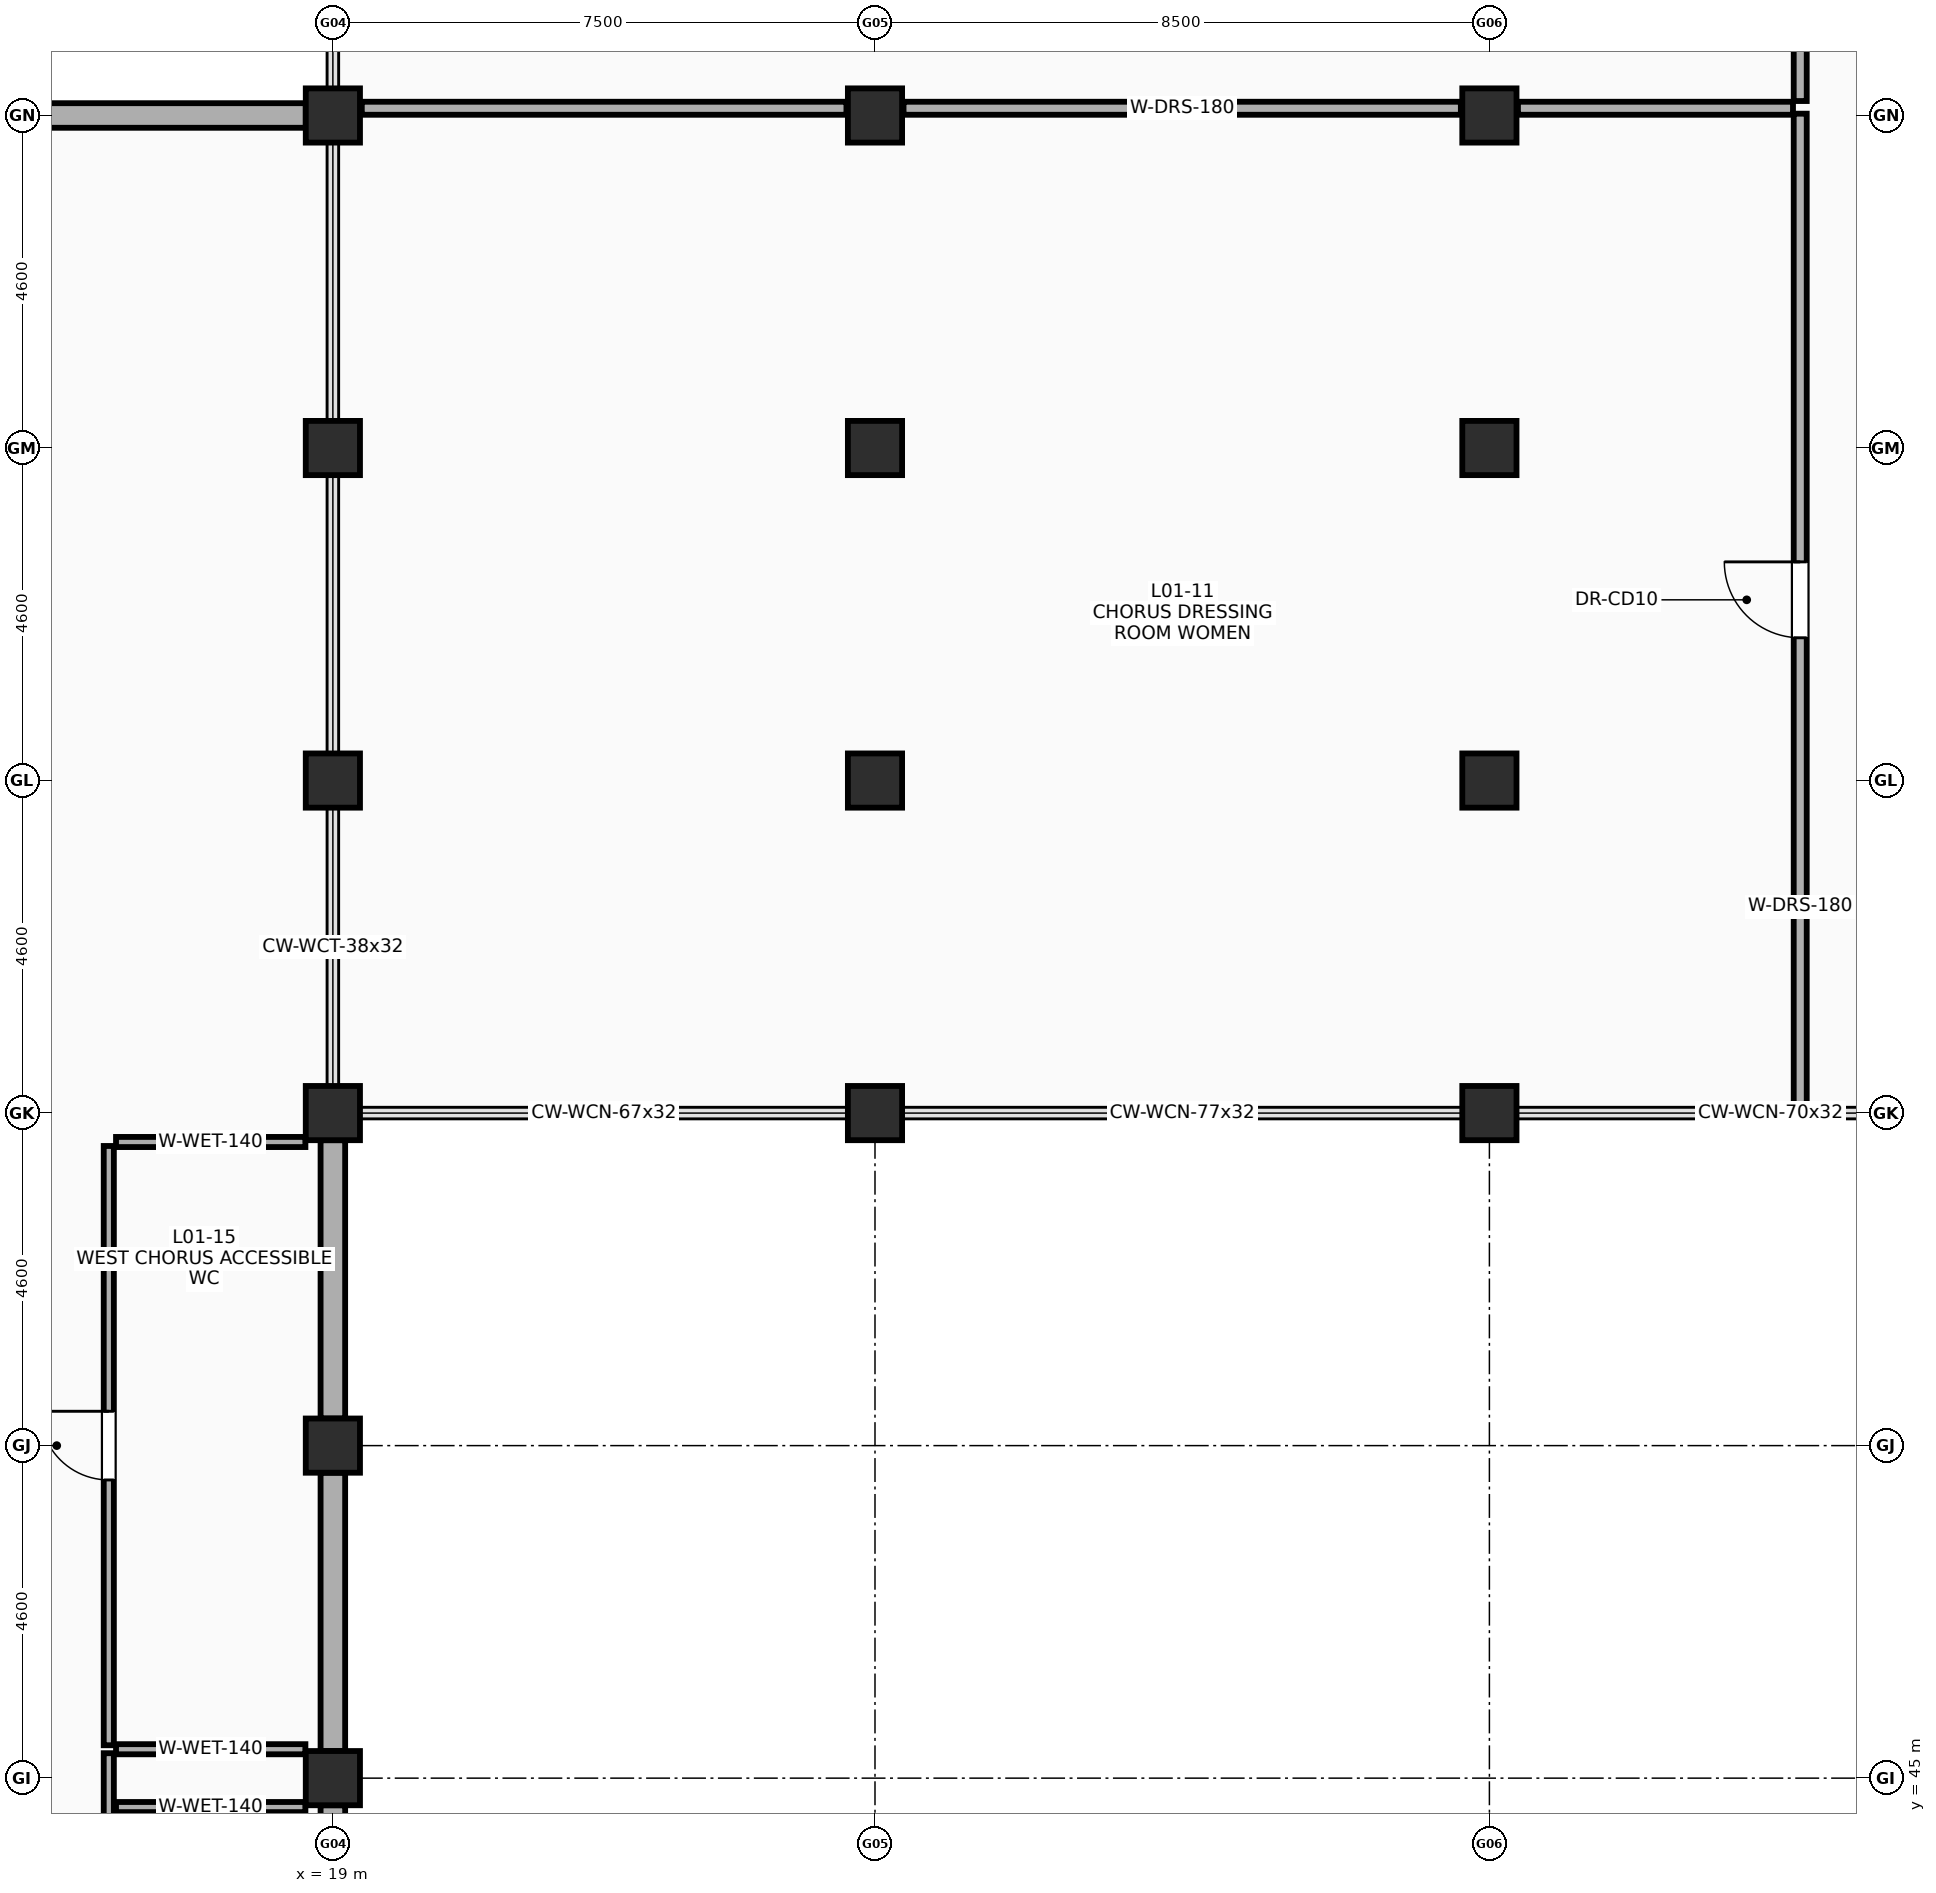
"""IFC4 building model, lengths in metres.
Left out: names, types, materials, properties, quantities, classifications, styles, units other than length and angle.
Written with IfcOpenShell. Run it as: python <this file> out.ifc"""

import sys

from ifc_helpers import new_model, si_unit, direction, frame, frame_2d, origin, origin_2d, place, context, subcontext, project, spatial, rectangle, extrude, element, fill, save


model = new_model("IFC4")
c1 = context("Model", 3, precision=1e-05, world=origin(), true_north=direction((0.0, 1.0)))
c2 = subcontext(c1, "Body", "Model", "MODEL_VIEW")
j1 = project(units=[si_unit("LENGTHUNIT", "METRE"), si_unit("PLANEANGLEUNIT", "RADIAN")], contexts=[c1])
p1 = place(None, origin())
s1 = spatial("IfcSite", under=j1, at=p1, CompositionType="ELEMENT")
p2 = place(p1, origin())
s2 = spatial("IfcBuilding", under=s1, at=p2, CompositionType="ELEMENT")
p3 = place(p2, frame((0.0, 0.0, 5.4)))
s3 = spatial("IfcBuildingStorey", under=s2, at=p3, CompositionType="ELEMENT", Elevation=5.4)
for number, where, z_axis, x_axis in (
    (1, (19.0, 45.0, 0.0), (0.0, 0.0, 1.0), (1.0, 0.0, 0.0)),
    (2, (19.0, 49.6, 0.0), (0.0, 0.0, 1.0), (1.0, 0.0, 0.0)),
    (3, (19.0, 54.2, 0.0), (0.0, 0.0, 1.0), (1.0, 0.0, 0.0)),
    (4, (19.0, 58.8, 0.0), (0.0, 0.0, 1.0), (1.0, 0.0, 0.0)),
    (5, (19.0, 63.4, 0.0), (0.0, 0.0, 1.0), (1.0, 0.0, 0.0)),
    (6, (19.0, 68.0, 0.0), (0.0, 0.0, 1.0), (1.0, 0.0, 0.0)),
    (7, (26.5, 54.2, 0.0), (0.0, 0.0, 1.0), (1.0, 0.0, 0.0)),
    (8, (26.5, 58.8, 0.0), (0.0, 0.0, 1.0), (1.0, 0.0, 0.0)),
    (9, (26.5, 63.4, 0.0), (0.0, 0.0, 1.0), (1.0, 0.0, 0.0)),
    (10, (26.5, 68.0, 0.0), (0.0, 0.0, 1.0), (1.0, 0.0, 0.0)),
    (11, (35.0, 54.2, 0.0), (0.0, 0.0, 1.0), (1.0, 0.0, 0.0)),
    (12, (35.0, 58.8, 0.0), (0.0, 0.0, 1.0), (1.0, 0.0, 0.0)),
    (13, (35.0, 63.4, 0.0), (0.0, 0.0, 1.0), (1.0, 0.0, 0.0)),
    (14, (35.0, 68.0, 0.0), (0.0, 0.0, 1.0), (1.0, 0.0, 0.0)),
):
    element("IfcColumn", number, at=place(p3, frame(where, z_axis=z_axis, x_axis=x_axis)), inside=s3, PredefinedType="COLUMN", context=c2, shape_type="SweptSolid", body=[
        extrude(rectangle(XDim=0.75, YDim=0.75, at=origin_2d()), origin(), (0.0, 0.0, 1.0), 4.4),
    ])
p4 = place(p3, frame((13.875, 68.0, 0.0), z_axis=(0.0, 0.0, 1.0), x_axis=(1.0, 0.0, 0.0)))
e15 = element("IfcWall", 15, at=p4, inside=s3, PredefinedType="SOLIDWALL", context=c2, shape_type="SweptSolid", body=[
    extrude(rectangle(XDim=4.75, YDim=0.34, at=frame_2d((2.375, 0.0))), origin(), (0.0, 0.0, 1.0), 3.2),
])
for number, where, z_axis, x_axis in (
    (16, (19.0, 40.775, 0.0), (0.0, 0.0, 1.0), (0.0, 1.0, 0.0)),
    (17, (19.0, 45.375, 0.0), (0.0, 0.0, 1.0), (0.0, 1.0, 0.0)),
):
    element("IfcWall", number, at=place(p3, frame(where, z_axis=z_axis, x_axis=x_axis)), inside=s3, PredefinedType="SOLIDWALL", context=c2, shape_type="SweptSolid", body=[
        extrude(rectangle(XDim=3.85, YDim=0.34, at=frame_2d((1.925, 0.0))), origin(), (0.0, 0.0, 1.0), 3.2),
    ])
p5 = place(p3, frame((19.0, 49.975, 0.0), z_axis=(0.0, 0.0, 1.0), x_axis=(0.0, 1.0, 0.0)))
e18 = element("IfcWall", 18, at=p5, inside=s3, PredefinedType="SOLIDWALL", context=c2, shape_type="SweptSolid", body=[
    extrude(rectangle(XDim=3.85, YDim=0.34, at=frame_2d((1.925, 0.0))), origin(), (0.0, 0.0, 1.0), 3.2),
])
p6 = place(p3, frame((26.895, 68.1, 0.0), z_axis=(0.0, 0.0, 1.0), x_axis=(1.0, 0.0, 0.0)))
e19 = element("IfcWall", 19, at=p6, inside=s3, PredefinedType="PARTITIONING", context=c2, shape_type="SweptSolid", body=[
    extrude(rectangle(XDim=7.71, YDim=0.18, at=frame_2d((3.855, 0.0))), origin(), (0.0, 0.0, 1.0), 3.3),
])
p7 = place(p3, frame((19.4, 68.1, 0.0), z_axis=(0.0, 0.0, 1.0), x_axis=(1.0, 0.0, 0.0)))
e20 = element("IfcWall", 20, at=p7, inside=s3, PredefinedType="PARTITIONING", context=c2, shape_type="SweptSolid", body=[
    extrude(rectangle(XDim=6.705, YDim=0.18, at=frame_2d((3.353, 0.0))), origin(), (0.0, 0.0, 1.0), 3.3),
])
p8 = place(p3, frame((35.395, 68.1, 0.0), z_axis=(0.0, 0.0, 1.0), x_axis=(1.0, 0.0, 0.0)))
e21 = element("IfcWall", 21, at=p8, inside=s3, PredefinedType="PARTITIONING", context=c2, shape_type="SweptSolid", body=[
    extrude(rectangle(XDim=3.805, YDim=0.18, at=frame_2d((1.902, 0.0))), origin(), (0.0, 0.0, 1.0), 3.3),
])
p9 = place(p3, frame((39.3, 54.285, 0.0), z_axis=(0.0, 0.0, 1.0), x_axis=(0.0, 1.0, 0.0)))
e22 = element("IfcWall", 22, at=p9, inside=s3, PredefinedType="PARTITIONING", context=c2, shape_type="SweptSolid", body=[
    extrude(rectangle(XDim=13.74, YDim=0.18, at=frame_2d((6.87, 0.0))), origin(), (0.0, 0.0, 1.0), 3.3),
])
p10 = place(p9, frame((6.49, 0.0, 0.0)))
e23 = element("IfcOpeningElement", 23, at=p10, cuts=e22, PredefinedType="OPENING", context=c2, shape_type="SweptSolid", body=[
    extrude(rectangle(XDim=1.05, YDim=2.15, at=frame_2d((0.525, 1.075))), frame((0.0, 0.1, 0.0), z_axis=(0.0, -1.0, 0.0), x_axis=(1.0, 0.0, 0.0)), (0.0, 0.0, 1.0), 0.2),
])
p11 = place(p3, frame((39.3, 68.2, 0.0), z_axis=(0.0, 0.0, 1.0), x_axis=(0.0, 1.0, 0.0)))
e24 = element("IfcWall", 24, at=p11, inside=s3, PredefinedType="PARTITIONING", context=c2, shape_type="SweptSolid", body=[
    extrude(rectangle(XDim=13.325, YDim=0.18, at=frame_2d((6.663, 0.0))), origin(), (0.0, 0.0, 1.0), 3.3),
])
p12 = place(p11, frame((6.175, 0.0, 0.0)))
e25 = element("IfcOpeningElement", 25, at=p12, cuts=e24, PredefinedType="OPENING", context=c2, shape_type="SweptSolid", body=[
    extrude(rectangle(XDim=1.05, YDim=2.15, at=frame_2d((0.525, 1.075))), frame((0.0, 0.1, 0.0), z_axis=(0.0, -1.0, 0.0), x_axis=(1.0, 0.0, 0.0)), (0.0, 0.0, 1.0), 0.2),
])
p13 = place(p3, frame((15.9, 31.375, 0.0), z_axis=(0.0, 0.0, 1.0), x_axis=(0.0, 1.0, 0.0)))
e26 = element("IfcWall", 26, at=p13, inside=s3, PredefinedType="PARTITIONING", context=c2, shape_type="SweptSolid", body=[
    extrude(rectangle(XDim=13.97, YDim=0.14, at=frame_2d((6.985, 0.0))), origin(), (0.0, 0.0, 1.0), 3.5),
])
p14 = place(p13, frame((6.275, 0.0, 0.0)))
e27 = element("IfcOpeningElement", 27, at=p14, cuts=e26, PredefinedType="OPENING", context=c2, shape_type="SweptSolid", body=[
    extrude(rectangle(XDim=0.9, YDim=2.1, at=frame_2d((0.45, 1.05))), frame((0.0, 0.08, 0.0), z_axis=(0.0, -1.0, 0.0), x_axis=(1.0, 0.0, 0.0)), (0.0, 0.0, 1.0), 0.16),
])
p15 = place(p3, frame((15.9, 45.455, 0.0), z_axis=(0.0, 0.0, 1.0), x_axis=(0.0, 1.0, 0.0)))
e28 = element("IfcWall", 28, at=p15, inside=s3, PredefinedType="PARTITIONING", context=c2, shape_type="SweptSolid", body=[
    extrude(rectangle(XDim=8.29, YDim=0.14, at=frame_2d((4.145, 0.0))), origin(), (0.0, 0.0, 1.0), 3.53),
])
p16 = place(p15, frame((3.67, 0.0, 0.0)))
e29 = element("IfcOpeningElement", 29, at=p16, cuts=e28, PredefinedType="OPENING", context=c2, shape_type="SweptSolid", body=[
    extrude(rectangle(XDim=0.95, YDim=2.1, at=frame_2d((0.475, 1.05))), frame((0.0, 0.08, 0.0), z_axis=(0.0, -1.0, 0.0), x_axis=(1.0, 0.0, 0.0)), (0.0, 0.0, 1.0), 0.16),
])
for number, where, z_axis, x_axis in (
    (30, (16.0, 44.6, 0.0), (0.0, 0.0, 1.0), (1.0, 0.0, 0.0)),
    (31, (16.0, 45.4, 0.0), (0.0, 0.0, 1.0), (1.0, 0.0, 0.0)),
    (32, (16.0, 53.8, 0.0), (0.0, 0.0, 1.0), (1.0, 0.0, 0.0)),
):
    element("IfcWall", number, at=place(p3, frame(where, z_axis=z_axis, x_axis=x_axis)), inside=s3, PredefinedType="PARTITIONING", context=c2, shape_type="SweptSolid", body=[
        extrude(rectangle(XDim=2.62, YDim=0.14, at=frame_2d((1.31, 0.0))), origin(), (0.0, 0.0, 1.0), 4.02),
    ])
p17 = place(p10, origin())
e33 = element("IfcDoor", 33, at=p17, inside=s3, OperationType="SINGLE_SWING_RIGHT", PredefinedType="DOOR", context=c2, shape_type="SweptSolid", body=[
    extrude(rectangle(XDim=1.05, YDim=2.15, at=frame_2d((0.525, 1.075))), frame((0.0, 0.025, 0.0), z_axis=(0.0, -1.0, 0.0), x_axis=(1.0, 0.0, 0.0)), (0.0, 0.0, 1.0), 0.05),
])
fill(e23, e33)
p18 = place(p16, origin())
e34 = element("IfcDoor", 34, at=p18, inside=s3, OperationType="SINGLE_SWING_RIGHT", PredefinedType="DOOR", context=c2, shape_type="SweptSolid", body=[
    extrude(rectangle(XDim=0.95, YDim=2.1, at=frame_2d((0.475, 1.05))), frame((0.0, 0.025, 0.0), z_axis=(0.0, -1.0, 0.0), x_axis=(1.0, 0.0, 0.0)), (0.0, 0.0, 1.0), 0.05),
])
fill(e29, e34)
save(model, sys.argv[1])
